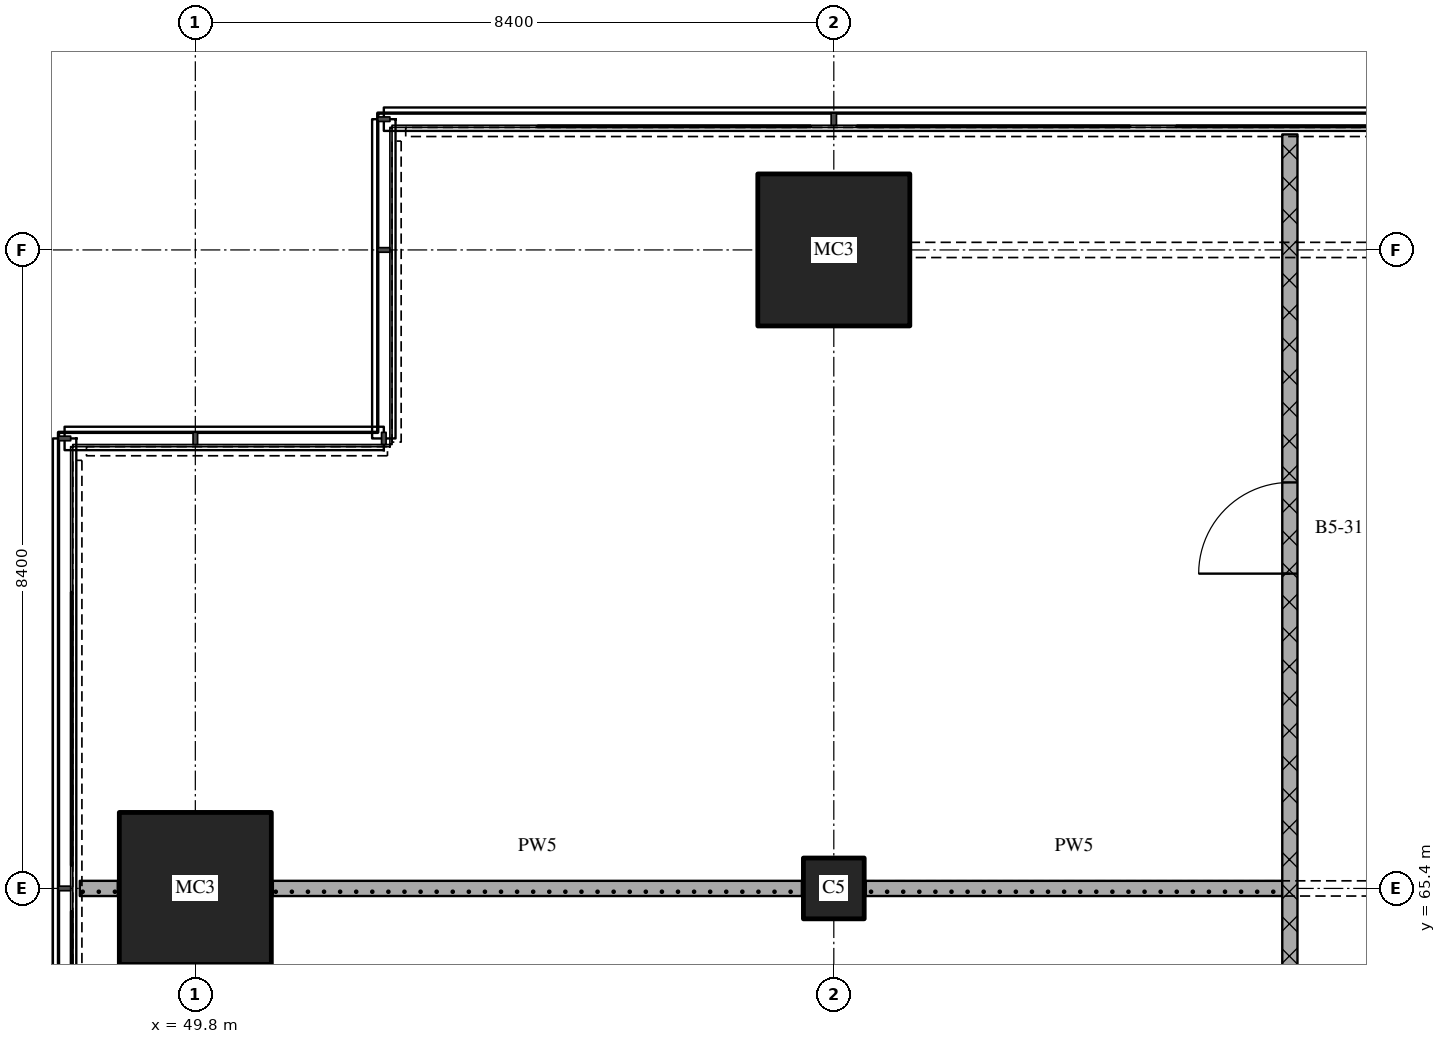
"""IFC4 building model, lengths in metres.
Left out: names, types, materials, properties, quantities, classifications, styles, units other than length and angle.
Written with IfcOpenShell. Run it as: python <this file> out.ifc"""

import sys

from ifc_helpers import new_model, si_unit, direction, frame, frame_2d, origin, origin_2d, place, context, subcontext, project, spatial, rectangle, extrude, element, fill, save


model = new_model("IFC4")
c1 = context("Model", 3, precision=1e-05, world=origin(), true_north=direction((0.0, 1.0)))
c2 = subcontext(c1, "Body", "Model", "MODEL_VIEW")
j1 = project(units=[si_unit("LENGTHUNIT", "METRE"), si_unit("PLANEANGLEUNIT", "RADIAN")], contexts=[c1])
p1 = place(None, origin())
s1 = spatial("IfcSite", under=j1, at=p1, CompositionType="ELEMENT")
p2 = place(p1, origin())
s2 = spatial("IfcBuilding", under=s1, at=p2, CompositionType="ELEMENT")
p3 = place(p2, frame((0.0, 0.0, 138.45)))
s3 = spatial("IfcBuildingStorey", under=s2, at=p3, CompositionType="ELEMENT", Elevation=138.45)
p4 = place(p3, frame((49.8, 65.4, 0.0), z_axis=(0.0, 0.0, 1.0), x_axis=(1.0, 0.0, 0.0)))
e1 = element("IfcColumn", 1, at=p4, inside=s3, PredefinedType="COLUMN", context=c2, shape_type="SweptSolid", body=[
    extrude(rectangle(XDim=2.0, YDim=2.0, at=origin_2d()), origin(), (0.0, 0.0, 1.0), 3.6),
])
p5 = place(p3, frame((58.2, 65.4, 0.0), z_axis=(0.0, 0.0, 1.0), x_axis=(1.0, 0.0, 0.0)))
e2 = element("IfcColumn", 2, at=p5, inside=s3, PredefinedType="COLUMN", context=c2, shape_type="SweptSolid", body=[
    extrude(rectangle(XDim=0.8, YDim=0.8, at=origin_2d()), origin(), (0.0, 0.0, 1.0), 3.6),
])
p6 = place(p3, frame((58.2, 73.8, 0.0), z_axis=(0.0, 0.0, 1.0), x_axis=(1.0, 0.0, 0.0)))
e3 = element("IfcColumn", 3, at=p6, inside=s3, PredefinedType="COLUMN", context=c2, shape_type="SweptSolid", body=[
    extrude(rectangle(XDim=2.0, YDim=2.0, at=origin_2d()), origin(), (0.0, 0.0, 1.0), 3.6),
])
p7 = place(p3, frame((48.28, 65.4, 0.0), z_axis=(0.0, 0.0, 1.0), x_axis=(1.0, 0.0, 0.0)))
e4 = element("IfcWall", 4, at=p7, inside=s3, PredefinedType="PARTITIONING", context=c2, shape_type="SweptSolid", body=[
    extrude(rectangle(XDim=0.5, YDim=0.2, at=frame_2d((0.25, 0.0))), origin(), (0.0, 0.0, 1.0), 3.3),
])
p8 = place(p3, frame((50.82, 65.4, 0.0), z_axis=(0.0, 0.0, 1.0), x_axis=(1.0, 0.0, 0.0)))
e5 = element("IfcWall", 5, at=p8, inside=s3, PredefinedType="PARTITIONING", context=c2, shape_type="SweptSolid", body=[
    extrude(rectangle(XDim=6.96, YDim=0.2, at=frame_2d((3.48, 0.0))), origin(), (0.0, 0.0, 1.0), 3.3),
])
p9 = place(p3, frame((58.62, 65.4, 0.0), z_axis=(0.0, 0.0, 1.0), x_axis=(1.0, 0.0, 0.0)))
e6 = element("IfcWall", 6, at=p9, inside=s3, PredefinedType="PARTITIONING", context=c2, shape_type="SweptSolid", body=[
    extrude(rectangle(XDim=5.48, YDim=0.2, at=frame_2d((2.74, 0.0))), origin(), (0.0, 0.0, 1.0), 2.9),
])
p10 = place(p3, frame((64.2, 43.3, 0.0), z_axis=(0.0, 0.0, 1.0), x_axis=(0.0, 1.0, 0.0)))
e7 = element("IfcWall", 7, at=p10, inside=s3, PredefinedType="PARTITIONING", context=c2, shape_type="SweptSolid", body=[
    extrude(rectangle(XDim=32.02, YDim=0.2, at=frame_2d((16.01, 0.0))), origin(), (0.0, 0.0, 1.0), 3.3),
])
p11 = place(p10, frame((17.3, 0.0, 0.0)))
e8 = element("IfcOpeningElement", 8, at=p11, cuts=e7, PredefinedType="OPENING", context=c2, shape_type="SweptSolid", body=[
    extrude(rectangle(XDim=1.2, YDim=2.1, at=frame_2d((0.6, 1.05))), frame((0.0, 0.11, 0.0), z_axis=(0.0, -1.0, 0.0), x_axis=(1.0, 0.0, 0.0)), (0.0, 0.0, 1.0), 0.22),
])
p12 = place(p10, frame((26.241, 0.0, 0.0)))
e9 = element("IfcOpeningElement", 9, at=p12, cuts=e7, PredefinedType="OPENING", context=c2, shape_type="SweptSolid", body=[
    extrude(rectangle(XDim=1.2, YDim=2.1, at=frame_2d((0.6, 1.05))), frame((0.0, 0.11, 0.0), z_axis=(0.0, -1.0, 0.0), x_axis=(1.0, 0.0, 0.0)), (0.0, 0.0, 1.0), 0.22),
])
p13 = place(p12, origin())
e10 = element("IfcDoor", 10, at=p13, inside=s3, OperationType="SINGLE_SWING_LEFT", PredefinedType="DOOR", context=c2, shape_type="SweptSolid", body=[
    extrude(rectangle(XDim=1.2, YDim=2.1, at=frame_2d((0.6, 1.05))), frame((0.0, 0.025, 0.0), z_axis=(0.0, -1.0, 0.0), x_axis=(1.0, 0.0, 0.0)), (0.0, 0.0, 1.0), 0.05),
])
fill(e9, e10)
save(model, sys.argv[1])
